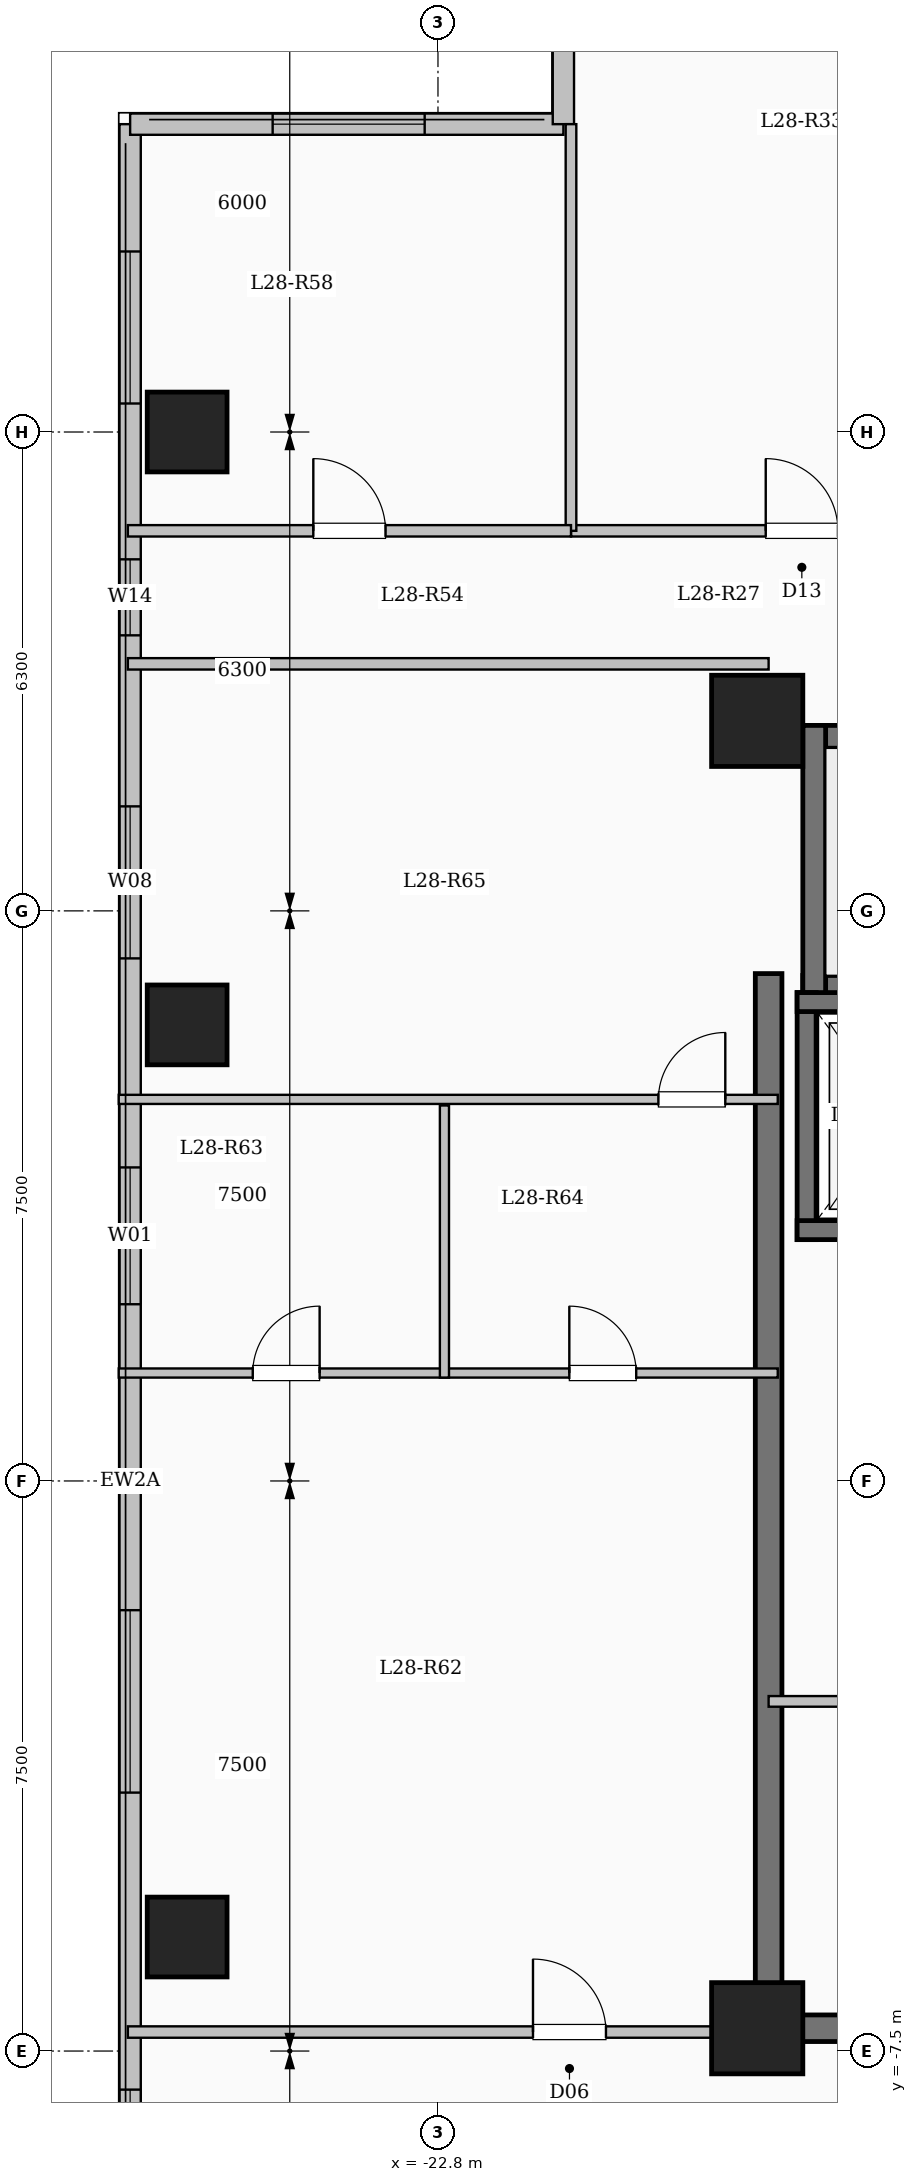
"""IFC4 building model, lengths in metres.
Left out: names, types, materials, properties, quantities, classifications, styles, units other than length and angle.
Written with IfcOpenShell. Run it as: python <this file> out.ifc"""

import sys

from ifc_helpers import new_model, si_unit, direction, frame, frame_2d, origin, origin_2d, place, context, subcontext, project, spatial, rectangle, extrude, element, fill, save


model = new_model("IFC4")
c1 = context("Model", 3, precision=1e-05, world=origin(), true_north=direction((0.0, 1.0)))
c2 = subcontext(c1, "Body", "Model", "MODEL_VIEW")
j1 = project(units=[si_unit("LENGTHUNIT", "METRE"), si_unit("PLANEANGLEUNIT", "RADIAN")], contexts=[c1])
p1 = place(None, origin())
s1 = spatial("IfcSite", under=j1, at=p1, CompositionType="ELEMENT")
p2 = place(p1, origin())
s2 = spatial("IfcBuilding", under=s1, at=p2, CompositionType="ELEMENT")
p3 = place(p2, frame((0.0, 0.0, 105.1)))
s3 = spatial("IfcBuildingStorey", under=s2, at=p3, CompositionType="ELEMENT", Elevation=105.1)
for number, where, z_axis, x_axis in (
    (1, (-18.6, -7.2, 0.0), (0.0, 0.0, 1.0), (1.0, 0.0, 0.0)),
    (2, (-18.6, 10.0, 0.0), (0.0, 0.0, 1.0), (1.0, 0.0, 0.0)),
):
    element("IfcColumn", number, at=place(p3, frame(where, z_axis=z_axis, x_axis=x_axis)), inside=s3, PredefinedType="COLUMN", context=c2, shape_type="SweptSolid", body=[
        extrude(rectangle(XDim=1.2, YDim=1.2, at=origin_2d()), origin(), (0.0, 0.0, 1.0), 3.35),
    ])
for number, where, z_axis, x_axis in (
    (3, (-26.1, -6.0, 0.0), (0.0, 0.0, 1.0), (1.0, 0.0, 0.0)),
    (4, (-26.1, 6.0, 0.0), (0.0, 0.0, 1.0), (1.0, 0.0, 0.0)),
    (5, (-26.1, 13.8, 0.0), (0.0, 0.0, 1.0), (1.0, 0.0, 0.0)),
):
    element("IfcColumn", number, at=place(p3, frame(where, z_axis=z_axis, x_axis=x_axis)), inside=s3, PredefinedType="COLUMN", context=c2, shape_type="SweptSolid", body=[
        extrude(rectangle(XDim=1.05, YDim=1.05, at=origin_2d()), origin(), (0.0, 0.0, 1.0), 3.35),
    ])
p4 = place(p3, frame((-26.85, -17.85, 0.0), z_axis=(0.0, 0.0, 1.0), x_axis=(0.0, 1.0, 0.0)))
e6 = element("IfcWall", 6, at=p4, inside=s3, PredefinedType="SOLIDWALL", context=c2, shape_type="SweptSolid", body=[
    extrude(rectangle(XDim=35.7, YDim=0.28, at=frame_2d((17.85, 0.0))), origin(), (0.0, 0.0, 1.0), 3.1),
])
p5 = place(p4, frame((2.55, 0.0, 0.9)))
e7 = element("IfcOpeningElement", 7, at=p5, cuts=e6, PredefinedType="OPENING", context=c2, shape_type="SweptSolid", body=[
    extrude(rectangle(XDim=2.4, YDim=1.8, at=frame_2d((1.2, 0.9))), frame((0.0, 0.15, 0.0), z_axis=(0.0, -1.0, 0.0), x_axis=(1.0, 0.0, 0.0)), (0.0, 0.0, 1.0), 0.3),
])
p6 = place(p4, frame((8.343, 0.0, 0.9)))
e8 = element("IfcOpeningElement", 8, at=p6, cuts=e6, PredefinedType="OPENING", context=c2, shape_type="SweptSolid", body=[
    extrude(rectangle(XDim=1.5, YDim=1.65, at=frame_2d((0.75, 0.825))), frame((0.0, 0.15, 0.0), z_axis=(0.0, -1.0, 0.0), x_axis=(1.0, 0.0, 0.0)), (0.0, 0.0, 1.0), 0.3),
])
p7 = place(p4, frame((13.75, 0.0, 0.9)))
e9 = element("IfcOpeningElement", 9, at=p7, cuts=e6, PredefinedType="OPENING", context=c2, shape_type="SweptSolid", body=[
    extrude(rectangle(XDim=2.4, YDim=1.8, at=frame_2d((1.2, 0.9))), frame((0.0, 0.15, 0.0), z_axis=(0.0, -1.0, 0.0), x_axis=(1.0, 0.0, 0.0)), (0.0, 0.0, 1.0), 0.3),
])
p8 = place(p4, frame((20.175, 0.0, 0.9)))
e10 = element("IfcOpeningElement", 10, at=p8, cuts=e6, PredefinedType="OPENING", context=c2, shape_type="SweptSolid", body=[
    extrude(rectangle(XDim=1.8, YDim=1.65, at=frame_2d((0.9, 0.825))), frame((0.0, 0.15, 0.0), z_axis=(0.0, -1.0, 0.0), x_axis=(1.0, 0.0, 0.0)), (0.0, 0.0, 1.0), 0.3),
])
p9 = place(p4, frame((24.725, 0.0, 0.9)))
e11 = element("IfcOpeningElement", 11, at=p9, cuts=e6, PredefinedType="OPENING", context=c2, shape_type="SweptSolid", body=[
    extrude(rectangle(XDim=2.0, YDim=1.7, at=frame_2d((1.0, 0.85))), frame((0.0, 0.15, 0.0), z_axis=(0.0, -1.0, 0.0), x_axis=(1.0, 0.0, 0.0)), (0.0, 0.0, 1.0), 0.3),
])
p10 = place(p4, frame((28.975, 0.0, 0.95)))
e12 = element("IfcOpeningElement", 12, at=p10, cuts=e6, PredefinedType="OPENING", context=c2, shape_type="SweptSolid", body=[
    extrude(rectangle(XDim=1.0, YDim=1.5, at=frame_2d((0.5, 0.75))), frame((0.0, 0.15, 0.0), z_axis=(0.0, -1.0, 0.0), x_axis=(1.0, 0.0, 0.0)), (0.0, 0.0, 1.0), 0.3),
])
p11 = place(p4, frame((32.025, 0.0, 0.9)))
e13 = element("IfcOpeningElement", 13, at=p11, cuts=e6, PredefinedType="OPENING", context=c2, shape_type="SweptSolid", body=[
    extrude(rectangle(XDim=2.0, YDim=1.7, at=frame_2d((1.0, 0.85))), frame((0.0, 0.15, 0.0), z_axis=(0.0, -1.0, 0.0), x_axis=(1.0, 0.0, 0.0)), (0.0, 0.0, 1.0), 0.3),
])
p12 = place(p3, frame((-26.85, 17.85, 0.0), z_axis=(0.0, 0.0, 1.0), x_axis=(1.0, 0.0, 0.0)))
e14 = element("IfcWall", 14, at=p12, inside=s3, PredefinedType="SOLIDWALL", context=c2, shape_type="SweptSolid", body=[
    extrude(rectangle(XDim=5.7, YDim=0.28, at=frame_2d((2.85, 0.0))), origin(), (0.0, 0.0, 1.0), 3.1),
])
p13 = place(p12, frame((1.875, 0.0, 0.9)))
e15 = element("IfcOpeningElement", 15, at=p13, cuts=e14, PredefinedType="OPENING", context=c2, shape_type="SweptSolid", body=[
    extrude(rectangle(XDim=2.0, YDim=1.7, at=frame_2d((1.0, 0.85))), frame((0.0, 0.15, 0.0), z_axis=(0.0, -1.0, 0.0), x_axis=(1.0, 0.0, 0.0)), (0.0, 0.0, 1.0), 0.3),
])
p14 = place(p3, frame((-21.15, 17.85, 0.0), z_axis=(0.0, 0.0, 1.0), x_axis=(0.0, 1.0, 0.0)))
e16 = element("IfcWall", 16, at=p14, inside=s3, PredefinedType="SOLIDWALL", context=c2, shape_type="SweptSolid", body=[
    extrude(rectangle(XDim=4.2, YDim=0.28, at=frame_2d((2.1, 0.0))), origin(), (0.0, 0.0, 1.0), 3.1),
])
p15 = place(p14, frame((1.082, 0.0, 0.9)))
e17 = element("IfcOpeningElement", 17, at=p15, cuts=e16, PredefinedType="OPENING", context=c2, shape_type="SweptSolid", body=[
    extrude(rectangle(XDim=2.0, YDim=1.7, at=frame_2d((1.0, 0.85))), frame((0.0, 0.15, 0.0), z_axis=(0.0, -1.0, 0.0), x_axis=(1.0, 0.0, 0.0)), (0.0, 0.0, 1.0), 0.3),
])
p16 = place(p3, frame((-18.0, 9.79, 0.0), z_axis=(0.0, 0.0, 1.0), x_axis=(1.0, 0.0, 0.0)))
e18 = element("IfcWall", 18, at=p16, inside=s3, PredefinedType="SHEAR", context=c2, shape_type="SweptSolid", body=[
    extrude(rectangle(XDim=8.0, YDim=0.3, at=frame_2d((4.0, 0.0))), origin(), (0.0, 0.0, 1.0), 3.35),
])
p17 = place(p3, frame((-18.0, 6.5, 0.0), z_axis=(0.0, 0.0, 1.0), x_axis=(1.0, 0.0, 0.0)))
e19 = element("IfcWall", 19, at=p17, inside=s3, PredefinedType="SHEAR", context=c2, shape_type="SweptSolid", body=[
    extrude(rectangle(XDim=8.0, YDim=0.3, at=frame_2d((4.0, 0.0))), origin(), (0.0, 0.0, 1.0), 3.35),
])
p18 = place(p17, frame((6.45, 0.0, 0.0)))
e20 = element("IfcOpeningElement", 20, at=p18, cuts=e19, PredefinedType="OPENING", context=c2, shape_type="SweptSolid", body=[
    extrude(rectangle(XDim=1.0, YDim=2.15, at=frame_2d((0.5, 1.075))), frame((0.0, 0.16, 0.0), z_axis=(0.0, -1.0, 0.0), x_axis=(1.0, 0.0, 0.0)), (0.0, 0.0, 1.0), 0.32),
])
p19 = place(p3, frame((-17.85, 6.35, 0.0), z_axis=(0.0, 0.0, 1.0), x_axis=(0.0, 1.0, 0.0)))
e21 = element("IfcWall", 21, at=p19, inside=s3, PredefinedType="SHEAR", context=c2, shape_type="SweptSolid", body=[
    extrude(rectangle(XDim=3.59, YDim=0.3, at=frame_2d((1.795, 0.0))), origin(), (0.0, 0.0, 1.0), 3.35),
])
p20 = place(p3, frame((-17.95, 3.175, 0.0), z_axis=(0.0, 0.0, 1.0), x_axis=(0.0, 1.0, 0.0)))
e22 = element("IfcWall", 22, at=p20, inside=s3, PredefinedType="SHEAR", context=c2, shape_type="SweptSolid", body=[
    extrude(rectangle(XDim=3.25, YDim=0.25, at=frame_2d((1.625, 0.0))), origin(), (0.0, 0.0, 1.0), 3.35),
])
for number, where, z_axis, x_axis in (
    (23, (-18.075, 3.3, 0.0), (0.0, 0.0, 1.0), (1.0, 0.0, 0.0)),
    (24, (-18.075, 6.3, 0.0), (0.0, 0.0, 1.0), (1.0, 0.0, 0.0)),
):
    element("IfcWall", number, at=place(p3, frame(where, z_axis=z_axis, x_axis=x_axis)), inside=s3, PredefinedType="SHEAR", context=c2, shape_type="SweptSolid", body=[
        extrude(rectangle(XDim=2.55, YDim=0.25, at=frame_2d((1.275, 0.0))), origin(), (0.0, 0.0, 1.0), 3.35),
    ])
p21 = place(p3, frame((-18.45, -7.375, 0.0), z_axis=(0.0, 0.0, 1.0), x_axis=(0.0, 1.0, 0.0)))
e25 = element("IfcWall", 25, at=p21, inside=s3, PredefinedType="SHEAR", context=c2, shape_type="SweptSolid", body=[
    extrude(rectangle(XDim=14.05, YDim=0.35, at=frame_2d((7.025, 0.0))), origin(), (0.0, 0.0, 1.0), 3.35),
])
p22 = place(p3, frame((-18.625, -7.2, 0.0), z_axis=(0.0, 0.0, 1.0), x_axis=(1.0, 0.0, 0.0)))
e26 = element("IfcWall", 26, at=p22, inside=s3, PredefinedType="SHEAR", context=c2, shape_type="SweptSolid", body=[
    extrude(rectangle(XDim=8.55, YDim=0.35, at=frame_2d((4.275, 0.0))), origin(), (0.0, 0.0, 1.0), 3.35),
])
p23 = place(p3, frame((-18.45, -2.9, 0.0), z_axis=(0.0, 0.0, 1.0), x_axis=(1.0, 0.0, 0.0)))
e27 = element("IfcWall", 27, at=p23, inside=s3, PredefinedType="PARTITIONING", context=c2, shape_type="SweptSolid", body=[
    extrude(rectangle(XDim=3.05, YDim=0.14, at=frame_2d((1.525, 0.0))), origin(), (0.0, 0.0, 1.0), 3.1),
])
p24 = place(p23, frame((1.05, 0.0, 0.0)))
e28 = element("IfcOpeningElement", 28, at=p24, cuts=e27, PredefinedType="OPENING", context=c2, shape_type="SweptSolid", body=[
    extrude(rectangle(XDim=0.9, YDim=2.08, at=frame_2d((0.45, 1.04))), frame((0.0, 0.08, 0.0), z_axis=(0.0, -1.0, 0.0), x_axis=(1.0, 0.0, 0.0)), (0.0, 0.0, 1.0), 0.16),
])
p25 = place(p3, frame((-21.05, 12.5, 0.0), z_axis=(0.0, 0.0, 1.0), x_axis=(1.0, 0.0, 0.0)))
e29 = element("IfcWall", 29, at=p25, inside=s3, PredefinedType="PARTITIONING", context=c2, shape_type="SweptSolid", body=[
    extrude(rectangle(XDim=17.2, YDim=0.15, at=frame_2d((8.6, 0.0))), origin(), (0.0, 0.0, 1.0), 3.1),
])
p26 = place(p25, frame((2.562, 0.0, 0.0)))
e30 = element("IfcOpeningElement", 30, at=p26, cuts=e29, PredefinedType="OPENING", context=c2, shape_type="SweptSolid", body=[
    extrude(rectangle(XDim=0.95, YDim=2.15, at=frame_2d((0.475, 1.075))), frame((0.0, 0.085, 0.0), z_axis=(0.0, -1.0, 0.0), x_axis=(1.0, 0.0, 0.0)), (0.0, 0.0, 1.0), 0.17),
])
p27 = place(p25, frame((8.726, 0.0, 0.0)))
e31 = element("IfcOpeningElement", 31, at=p27, cuts=e29, PredefinedType="OPENING", context=c2, shape_type="SweptSolid", body=[
    extrude(rectangle(XDim=0.95, YDim=2.15, at=frame_2d((0.475, 1.075))), frame((0.0, 0.085, 0.0), z_axis=(0.0, -1.0, 0.0), x_axis=(1.0, 0.0, 0.0)), (0.0, 0.0, 1.0), 0.17),
])
p28 = place(p25, frame((14.21, 0.0, 0.0)))
e32 = element("IfcOpeningElement", 32, at=p28, cuts=e29, PredefinedType="OPENING", context=c2, shape_type="SweptSolid", body=[
    extrude(rectangle(XDim=0.95, YDim=2.15, at=frame_2d((0.475, 1.075))), frame((0.0, 0.085, 0.0), z_axis=(0.0, -1.0, 0.0), x_axis=(1.0, 0.0, 0.0)), (0.0, 0.0, 1.0), 0.17),
])
p29 = place(p3, frame((-26.88, -7.25, 0.0), z_axis=(0.0, 0.0, 1.0), x_axis=(1.0, 0.0, 0.0)))
e33 = element("IfcWall", 33, at=p29, inside=s3, PredefinedType="PARTITIONING", context=c2, shape_type="SweptSolid", body=[
    extrude(rectangle(XDim=8.43, YDim=0.15, at=frame_2d((4.215, 0.0))), origin(), (0.0, 0.0, 1.0), 3.1),
])
p30 = place(p29, frame((5.33, 0.0, 0.0)))
e34 = element("IfcOpeningElement", 34, at=p30, cuts=e33, PredefinedType="OPENING", context=c2, shape_type="SweptSolid", body=[
    extrude(rectangle(XDim=0.96, YDim=2.15, at=frame_2d((0.48, 1.075))), frame((0.0, 0.085, 0.0), z_axis=(0.0, -1.0, 0.0), x_axis=(1.0, 0.0, 0.0)), (0.0, 0.0, 1.0), 0.17),
])
p31 = place(p3, frame((-26.88, 10.75, 0.0), z_axis=(0.0, 0.0, 1.0), x_axis=(1.0, 0.0, 0.0)))
e35 = element("IfcWall", 35, at=p31, inside=s3, PredefinedType="PARTITIONING", context=c2, shape_type="SweptSolid", body=[
    extrude(rectangle(XDim=8.43, YDim=0.15, at=frame_2d((4.215, 0.0))), origin(), (0.0, 0.0, 1.0), 3.1),
])
p32 = place(p3, frame((-21.05, 12.5, 0.0), z_axis=(0.0, 0.0, 1.0), x_axis=(0.0, 1.0, 0.0)))
e36 = element("IfcWall", 36, at=p32, inside=s3, PredefinedType="PARTITIONING", context=c2, shape_type="SweptSolid", body=[
    extrude(rectangle(XDim=5.35, YDim=0.14, at=frame_2d((2.675, 0.0))), origin(), (0.0, 0.0, 1.0), 3.1),
])
p33 = place(p3, frame((-26.88, 12.5, 0.0), z_axis=(0.0, 0.0, 1.0), x_axis=(1.0, 0.0, 0.0)))
e37 = element("IfcWall", 37, at=p33, inside=s3, PredefinedType="PARTITIONING", context=c2, shape_type="SweptSolid", body=[
    extrude(rectangle(XDim=5.83, YDim=0.15, at=frame_2d((2.915, 0.0))), origin(), (0.0, 0.0, 1.0), 3.1),
])
p34 = place(p33, frame((2.44, 0.0, 0.0)))
e38 = element("IfcOpeningElement", 38, at=p34, cuts=e37, PredefinedType="OPENING", context=c2, shape_type="SweptSolid", body=[
    extrude(rectangle(XDim=0.95, YDim=2.15, at=frame_2d((0.475, 1.075))), frame((0.0, 0.085, 0.0), z_axis=(0.0, -1.0, 0.0), x_axis=(1.0, 0.0, 0.0)), (0.0, 0.0, 1.0), 0.17),
])
p35 = place(p3, frame((-27.0, 1.42, 0.0), z_axis=(0.0, 0.0, 1.0), x_axis=(1.0, 0.0, 0.0)))
e39 = element("IfcWall", 39, at=p35, inside=s3, PredefinedType="PARTITIONING", context=c2, shape_type="SweptSolid", body=[
    extrude(rectangle(XDim=8.67, YDim=0.12, at=frame_2d((4.335, 0.0))), origin(), (0.0, 0.0, 1.0), 3.1),
])
p36 = place(p35, frame((1.763, 0.0, 0.0)))
e40 = element("IfcOpeningElement", 40, at=p36, cuts=e39, PredefinedType="OPENING", context=c2, shape_type="SweptSolid", body=[
    extrude(rectangle(XDim=0.88, YDim=2.1, at=frame_2d((0.44, 1.05))), frame((0.0, 0.07, 0.0), z_axis=(0.0, -1.0, 0.0), x_axis=(1.0, 0.0, 0.0)), (0.0, 0.0, 1.0), 0.14),
])
p37 = place(p35, frame((5.928, 0.0, 0.0)))
e41 = element("IfcOpeningElement", 41, at=p37, cuts=e39, PredefinedType="OPENING", context=c2, shape_type="SweptSolid", body=[
    extrude(rectangle(XDim=0.88, YDim=2.1, at=frame_2d((0.44, 1.05))), frame((0.0, 0.07, 0.0), z_axis=(0.0, -1.0, 0.0), x_axis=(1.0, 0.0, 0.0)), (0.0, 0.0, 1.0), 0.14),
])
p38 = place(p3, frame((-27.0, 5.02, 0.0), z_axis=(0.0, 0.0, 1.0), x_axis=(1.0, 0.0, 0.0)))
e42 = element("IfcWall", 42, at=p38, inside=s3, PredefinedType="PARTITIONING", context=c2, shape_type="SweptSolid", body=[
    extrude(rectangle(XDim=8.67, YDim=0.12, at=frame_2d((4.335, 0.0))), origin(), (0.0, 0.0, 1.0), 3.1),
])
p39 = place(p38, frame((7.1, 0.0, 0.0)))
e43 = element("IfcOpeningElement", 43, at=p39, cuts=e42, PredefinedType="OPENING", context=c2, shape_type="SweptSolid", body=[
    extrude(rectangle(XDim=0.88, YDim=2.1, at=frame_2d((0.44, 1.05))), frame((0.0, 0.07, 0.0), z_axis=(0.0, -1.0, 0.0), x_axis=(1.0, 0.0, 0.0)), (0.0, 0.0, 1.0), 0.14),
])
p40 = place(p3, frame((-22.715, 1.36, 0.0), z_axis=(0.0, 0.0, 1.0), x_axis=(0.0, 1.0, 0.0)))
e44 = element("IfcWall", 44, at=p40, inside=s3, PredefinedType="PARTITIONING", context=c2, shape_type="SweptSolid", body=[
    extrude(rectangle(XDim=3.58, YDim=0.12, at=frame_2d((1.79, 0.0))), origin(), (0.0, 0.0, 1.0), 3.1),
])
p41 = place(p6, origin())
e45 = element("IfcWindow", 45, at=p41, inside=s3, PartitioningType="SINGLE_PANEL", PredefinedType="WINDOW", context=c2, shape_type="SweptSolid", body=[
    extrude(rectangle(XDim=1.5, YDim=1.65, at=frame_2d((0.75, 0.825))), frame((0.0, 0.03, 0.0), z_axis=(0.0, -1.0, 0.0), x_axis=(1.0, 0.0, 0.0)), (0.0, 0.0, 1.0), 0.06),
])
fill(e8, e45)
p42 = place(p7, origin())
e46 = element("IfcWindow", 46, at=p42, inside=s3, PartitioningType="SINGLE_PANEL", PredefinedType="WINDOW", context=c2, shape_type="SweptSolid", body=[
    extrude(rectangle(XDim=2.4, YDim=1.8, at=frame_2d((1.2, 0.9))), frame((0.0, 0.03, 0.0), z_axis=(0.0, -1.0, 0.0), x_axis=(1.0, 0.0, 0.0)), (0.0, 0.0, 1.0), 0.06),
])
fill(e9, e46)
p43 = place(p8, origin())
e47 = element("IfcWindow", 47, at=p43, inside=s3, PartitioningType="SINGLE_PANEL", PredefinedType="WINDOW", context=c2, shape_type="SweptSolid", body=[
    extrude(rectangle(XDim=1.8, YDim=1.65, at=frame_2d((0.9, 0.825))), frame((0.0, 0.03, 0.0), z_axis=(0.0, -1.0, 0.0), x_axis=(1.0, 0.0, 0.0)), (0.0, 0.0, 1.0), 0.06),
])
fill(e10, e47)
p44 = place(p9, origin())
e48 = element("IfcWindow", 48, at=p44, inside=s3, PartitioningType="SINGLE_PANEL", PredefinedType="WINDOW", context=c2, shape_type="SweptSolid", body=[
    extrude(rectangle(XDim=2.0, YDim=1.7, at=frame_2d((1.0, 0.85))), frame((0.0, 0.03, 0.0), z_axis=(0.0, -1.0, 0.0), x_axis=(1.0, 0.0, 0.0)), (0.0, 0.0, 1.0), 0.06),
])
fill(e11, e48)
p45 = place(p10, origin())
e49 = element("IfcWindow", 49, at=p45, inside=s3, PartitioningType="SINGLE_PANEL", PredefinedType="WINDOW", context=c2, shape_type="SweptSolid", body=[
    extrude(rectangle(XDim=1.0, YDim=1.5, at=frame_2d((0.5, 0.75))), frame((0.0, 0.03, 0.0), z_axis=(0.0, -1.0, 0.0), x_axis=(1.0, 0.0, 0.0)), (0.0, 0.0, 1.0), 0.06),
])
fill(e12, e49)
p46 = place(p11, origin())
e50 = element("IfcWindow", 50, at=p46, inside=s3, PartitioningType="SINGLE_PANEL", PredefinedType="WINDOW", context=c2, shape_type="SweptSolid", body=[
    extrude(rectangle(XDim=2.0, YDim=1.7, at=frame_2d((1.0, 0.85))), frame((0.0, 0.03, 0.0), z_axis=(0.0, -1.0, 0.0), x_axis=(1.0, 0.0, 0.0)), (0.0, 0.0, 1.0), 0.06),
])
fill(e13, e50)
p47 = place(p13, origin())
e51 = element("IfcWindow", 51, at=p47, inside=s3, PartitioningType="SINGLE_PANEL", PredefinedType="WINDOW", context=c2, shape_type="SweptSolid", body=[
    extrude(rectangle(XDim=2.0, YDim=1.7, at=frame_2d((1.0, 0.85))), frame((0.0, 0.03, 0.0), z_axis=(0.0, -1.0, 0.0), x_axis=(1.0, 0.0, 0.0)), (0.0, 0.0, 1.0), 0.06),
])
fill(e15, e51)
p48 = place(p26, origin())
e52 = element("IfcDoor", 52, at=p48, inside=s3, OperationType="SINGLE_SWING_LEFT", PredefinedType="DOOR", context=c2, shape_type="SweptSolid", body=[
    extrude(rectangle(XDim=0.95, YDim=2.15, at=frame_2d((0.475, 1.075))), frame((0.0, 0.025, 0.0), z_axis=(0.0, -1.0, 0.0), x_axis=(1.0, 0.0, 0.0)), (0.0, 0.0, 1.0), 0.05),
])
fill(e30, e52)
p49 = place(p34, origin())
e53 = element("IfcDoor", 53, at=p49, inside=s3, OperationType="SINGLE_SWING_LEFT", PredefinedType="DOOR", context=c2, shape_type="SweptSolid", body=[
    extrude(rectangle(XDim=0.95, YDim=2.15, at=frame_2d((0.475, 1.075))), frame((0.0, 0.025, 0.0), z_axis=(0.0, -1.0, 0.0), x_axis=(1.0, 0.0, 0.0)), (0.0, 0.0, 1.0), 0.05),
])
fill(e38, e53)
p50 = place(p30, origin())
e54 = element("IfcDoor", 54, at=p50, inside=s3, OperationType="SINGLE_SWING_LEFT", PredefinedType="DOOR", context=c2, shape_type="SweptSolid", body=[
    extrude(rectangle(XDim=0.96, YDim=2.15, at=frame_2d((0.48, 1.075))), frame((0.0, 0.025, 0.0), z_axis=(0.0, -1.0, 0.0), x_axis=(1.0, 0.0, 0.0)), (0.0, 0.0, 1.0), 0.05),
])
fill(e34, e54)
p51 = place(p36, origin())
e55 = element("IfcDoor", 55, at=p51, inside=s3, OperationType="SINGLE_SWING_RIGHT", PredefinedType="DOOR", context=c2, shape_type="SweptSolid", body=[
    extrude(rectangle(XDim=0.88, YDim=2.1, at=frame_2d((0.44, 1.05))), frame((0.0, 0.025, 0.0), z_axis=(0.0, -1.0, 0.0), x_axis=(1.0, 0.0, 0.0)), (0.0, 0.0, 1.0), 0.05),
])
fill(e40, e55)
p52 = place(p37, origin())
e56 = element("IfcDoor", 56, at=p52, inside=s3, OperationType="SINGLE_SWING_LEFT", PredefinedType="DOOR", context=c2, shape_type="SweptSolid", body=[
    extrude(rectangle(XDim=0.88, YDim=2.1, at=frame_2d((0.44, 1.05))), frame((0.0, 0.025, 0.0), z_axis=(0.0, -1.0, 0.0), x_axis=(1.0, 0.0, 0.0)), (0.0, 0.0, 1.0), 0.05),
])
fill(e41, e56)
p53 = place(p39, origin())
e57 = element("IfcDoor", 57, at=p53, inside=s3, OperationType="SINGLE_SWING_RIGHT", PredefinedType="DOOR", context=c2, shape_type="SweptSolid", body=[
    extrude(rectangle(XDim=0.88, YDim=2.1, at=frame_2d((0.44, 1.05))), frame((0.0, 0.025, 0.0), z_axis=(0.0, -1.0, 0.0), x_axis=(1.0, 0.0, 0.0)), (0.0, 0.0, 1.0), 0.05),
])
fill(e43, e57)
save(model, sys.argv[1])
